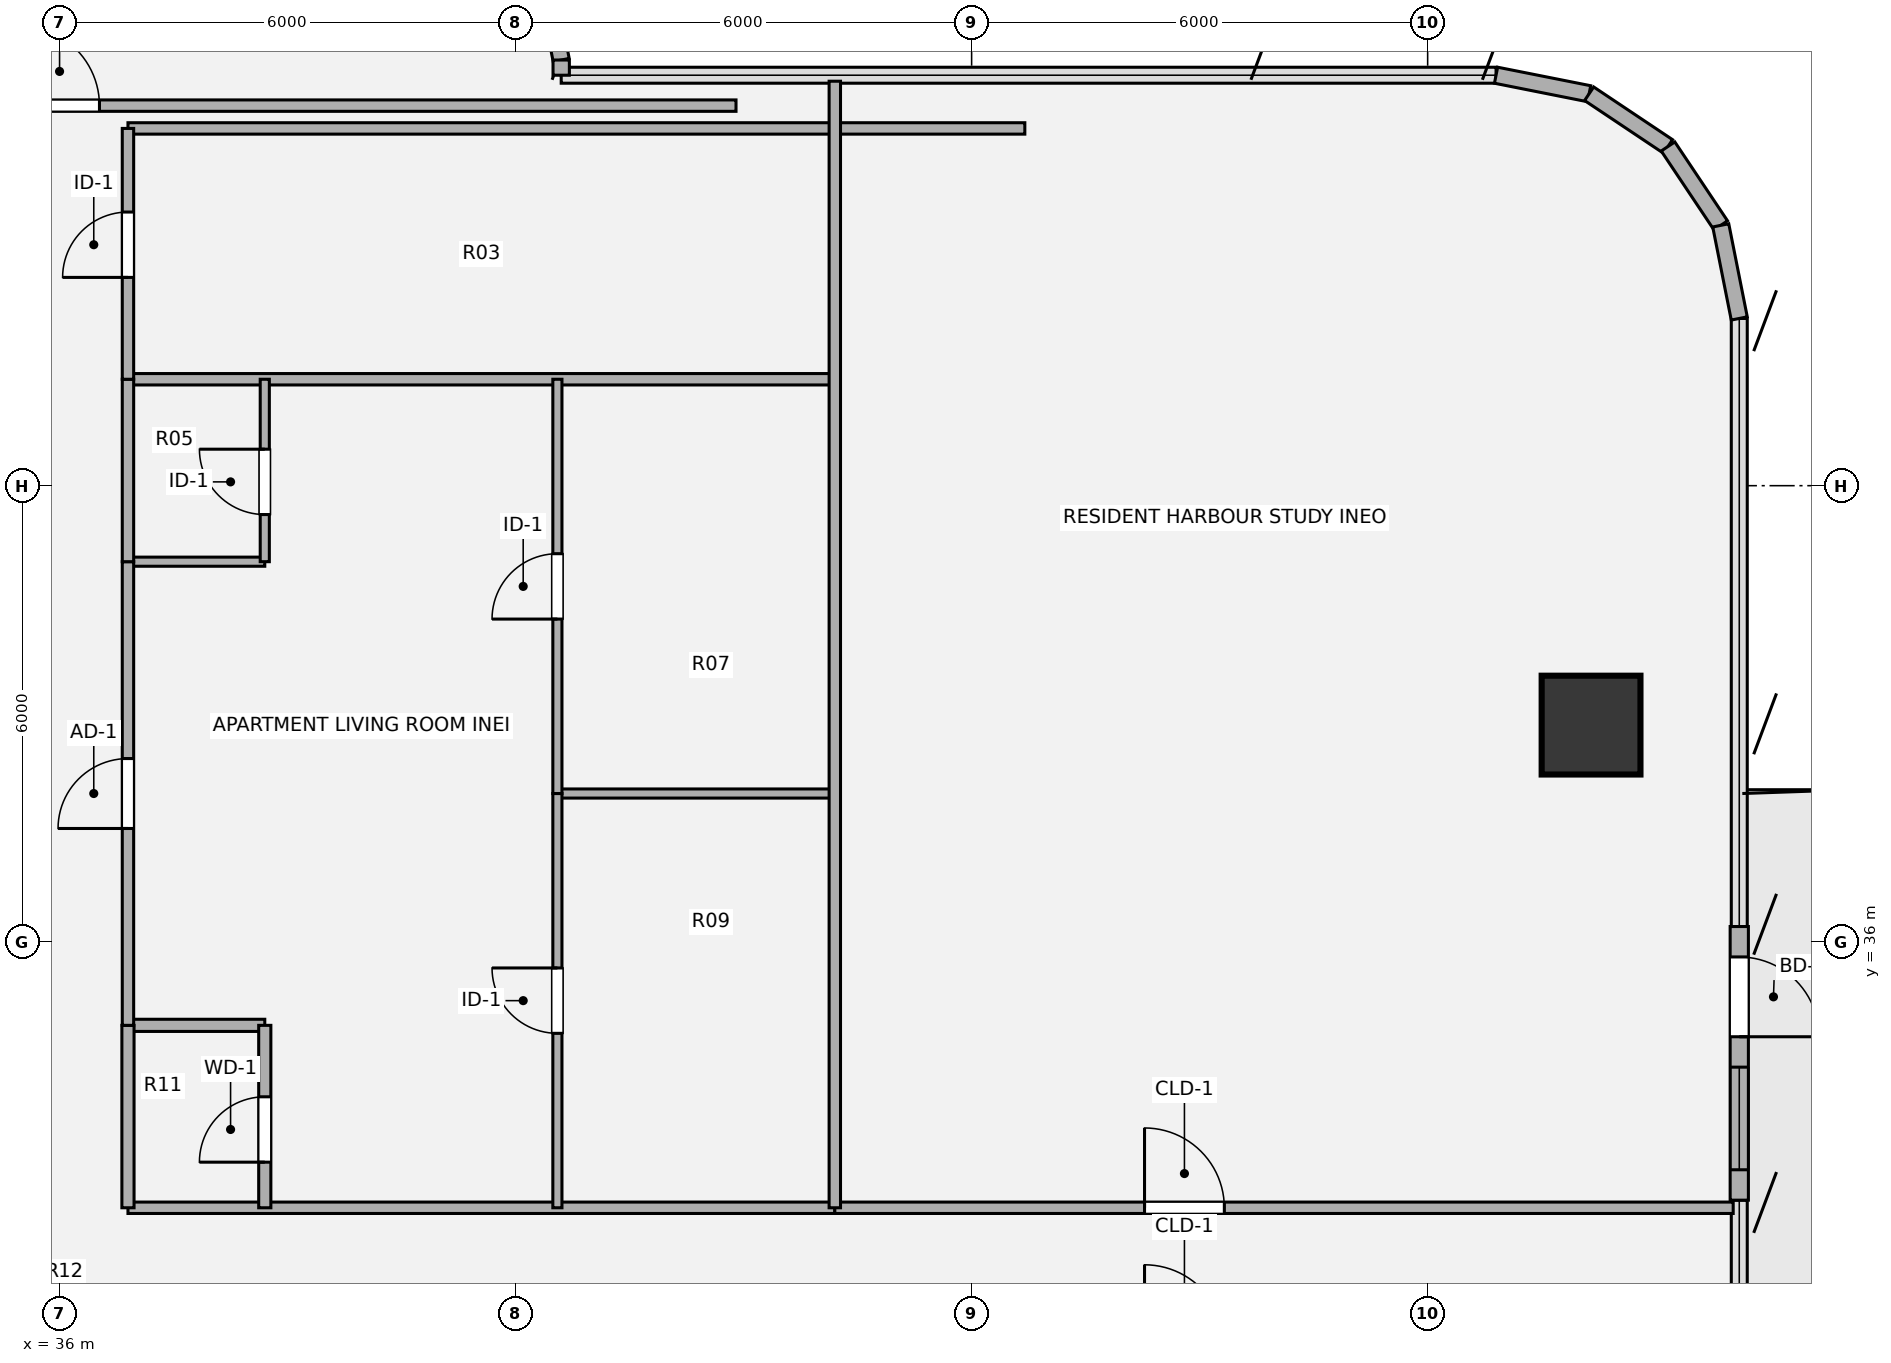
"""IFC4 building model, lengths in metres.
Left out: names, types, materials, properties, quantities, classifications, styles, units other than length and angle.
Written with IfcOpenShell. Run it as: python <this file> out.ifc"""

import sys

from ifc_helpers import new_model, si_unit, direction, frame, frame_2d, origin, origin_2d, place, context, subcontext, project, spatial, rectangle, hollow_circle, extrude, source, transform, mapped, element, fill, save


model = new_model("IFC4")
c1 = context("Model", 3, precision=1e-05, world=origin(), true_north=direction((0.0, 1.0)))
c2 = subcontext(c1, "Body", "Model", "MODEL_VIEW")
j1 = project(units=[si_unit("LENGTHUNIT", "METRE"), si_unit("PLANEANGLEUNIT", "RADIAN")], contexts=[c1])
p1 = place(None, origin())
s1 = spatial("IfcSite", under=j1, at=p1, CompositionType="ELEMENT")
p2 = place(p1, origin())
s2 = spatial("IfcBuilding", under=s1, at=p2, CompositionType="ELEMENT")
p3 = place(p2, frame((0.0, 0.0, 142.74)))
s3 = spatial("IfcBuildingStorey", under=s2, at=p3, CompositionType="ELEMENT", Elevation=142.74)
m1 = source(origin(), c2, "Body", "SweptSolid", [
    extrude(hollow_circle(Radius=0.65, WallThickness=0.045, at=origin_2d()), origin(), (0.0, 0.0, 1.0), 3.372),
])
p4 = place(p3, frame((56.15, 38.85, 0.0), z_axis=(0.0, 0.0, 1.0), x_axis=(1.0, 0.0, 0.0)))
e1 = element("IfcColumn", 1, at=p4, inside=s3, PredefinedType="COLUMN", context=c2, shape_type="MappedRepresentation", body=[
    mapped(m1, transform((0.0, 0.0, 0.0), x_axis=(1.0, 0.0, 0.0), y_axis=(0.0, 1.0, 0.0), z_axis=(0.0, 0.0, 1.0), scale=1.0)),
])
p5 = place(p3, frame((42.387, 48.671, 0.0), z_axis=(0.0, 0.0, 1.0), x_axis=(0.195127417394, -0.980777900945, 0.0)))
e2 = element("IfcWall", 2, at=p5, inside=s3, PredefinedType="SOLIDWALL", context=c2, shape_type="SweptSolid", body=[
    extrude(rectangle(XDim=1.092, YDim=0.215, at=frame_2d((0.546, 0.0))), origin(), (0.0, 0.0, 1.0), 3.372),
])
p6 = place(p3, frame((42.6, 47.6, 0.0), z_axis=(0.0, 0.0, 1.0), x_axis=(0.0, -1.0, 0.0)))
e3 = element("IfcWall", 3, at=p6, inside=s3, PredefinedType="SOLIDWALL", context=c2, shape_type="SweptSolid", body=[
    extrude(rectangle(XDim=0.2, YDim=0.215, at=frame_2d((0.1, 0.0))), origin(), (0.0, 0.0, 1.0), 3.372),
])
for number, where, z_axis, x_axis in (
    (4, (54.9, 47.4, 0.0), (0.0, 0.0, 1.0), (0.981, -0.195, 0.0)),
    (5, (56.125, 47.156, 0.0), (0.0, 0.0, 1.0), (0.831, -0.556, 0.0)),
    (6, (57.163, 46.463, 0.0), (0.0, 0.0, 1.0), (0.556, -0.831, 0.0)),
    (7, (57.856, 45.425, 0.0), (0.0, 0.0, 1.0), (0.195, -0.981, 0.0)),
):
    element("IfcWall", number, at=place(p3, frame(where, z_axis=z_axis, x_axis=x_axis)), inside=s3, PredefinedType="SOLIDWALL", context=c2, shape_type="SweptSolid", body=[
        extrude(rectangle(XDim=1.249, YDim=0.215, at=frame_2d((0.624, 0.0))), origin(), (0.0, 0.0, 1.0), 3.372),
    ])
p7 = place(p3, frame((58.1, 36.2, 0.0), z_axis=(0.0, 0.0, 1.0), x_axis=(0.0, -1.0, 0.0)))
e8 = element("IfcWall", 8, at=p7, inside=s3, PredefinedType="SOLIDWALL", context=c2, shape_type="SweptSolid", body=[
    extrude(rectangle(XDim=3.6, YDim=0.24, at=frame_2d((1.8, 0.0))), origin(), (0.0, 0.0, 1.0), 3.372),
])
p8 = place(p7, frame((0.4, 0.0, 0.0)))
e9 = element("IfcOpeningElement", 9, at=p8, cuts=e8, PredefinedType="OPENING", context=c2, shape_type="SweptSolid", body=[
    extrude(rectangle(XDim=1.05, YDim=2.15, at=origin_2d()), frame((0.525, 0.13, 1.075), z_axis=(0.0, -1.0, 0.0), x_axis=(1.0, 0.0, 0.0)), (0.0, 0.0, 1.0), 0.26),
])
p9 = place(p7, frame((1.85, 0.0, 0.85)))
e10 = element("IfcOpeningElement", 10, at=p9, cuts=e8, PredefinedType="OPENING", context=c2, shape_type="SweptSolid", body=[
    extrude(rectangle(XDim=1.35, YDim=1.35, at=origin_2d()), frame((0.675, 0.13, 0.675), z_axis=(0.0, -1.0, 0.0), x_axis=(1.0, 0.0, 0.0)), (0.0, 0.0, 1.0), 0.26),
])
p10 = place(p3, frame((36.9, 32.5, 0.0), z_axis=(0.0, 0.0, 1.0), x_axis=(1.0, 0.0, 0.0)))
e11 = element("IfcWall", 11, at=p10, inside=s3, PredefinedType="PARTITIONING", context=c2, shape_type="SweptSolid", body=[
    extrude(rectangle(XDim=9.3, YDim=0.15, at=frame_2d((4.65, 0.0))), origin(), (0.0, 0.0, 1.0), 2.824),
])
p11 = place(p3, frame((46.2, 32.5, 0.0), z_axis=(0.0, 0.0, 1.0), x_axis=(1.0, 0.0, 0.0)))
e12 = element("IfcWall", 12, at=p11, inside=s3, PredefinedType="PARTITIONING", context=c2, shape_type="SweptSolid", body=[
    extrude(rectangle(XDim=11.82, YDim=0.15, at=frame_2d((5.91, 0.0))), origin(), (0.0, 0.0, 1.0), 2.824),
])
p12 = place(p11, frame((4.075, 0.0, 0.0)))
e13 = element("IfcOpeningElement", 13, at=p12, cuts=e12, PredefinedType="OPENING", context=c2, shape_type="SweptSolid", body=[
    extrude(rectangle(XDim=1.05, YDim=2.1, at=origin_2d()), frame((0.525, 0.085, 1.05), z_axis=(0.0, -1.0, 0.0), x_axis=(1.0, 0.0, 0.0)), (0.0, 0.0, 1.0), 0.17),
])
p13 = place(p3, frame((36.9, 34.9, 0.0), z_axis=(0.0, 0.0, 1.0), x_axis=(1.0, 0.0, 0.0)))
e14 = element("IfcWall", 14, at=p13, inside=s3, PredefinedType="PLUMBINGWALL", context=c2, shape_type="SweptSolid", body=[
    extrude(rectangle(XDim=1.8, YDim=0.16, at=frame_2d((0.9, 0.0))), origin(), (0.0, 0.0, 1.0), 3.101),
])
p14 = place(p3, frame((42.55, 37.95, 0.0), z_axis=(0.0, 0.0, 1.0), x_axis=(1.0, 0.0, 0.0)))
e15 = element("IfcWall", 15, at=p14, inside=s3, PredefinedType="PARTITIONING", context=c2, shape_type="SweptSolid", body=[
    extrude(rectangle(XDim=3.65, YDim=0.12, at=frame_2d((1.825, 0.0))), origin(), (0.0, 0.0, 1.0), 3.342),
])
p15 = place(p3, frame((36.9, 41.0, 0.0), z_axis=(0.0, 0.0, 1.0), x_axis=(1.0, 0.0, 0.0)))
e16 = element("IfcWall", 16, at=p15, inside=s3, PredefinedType="PARTITIONING", context=c2, shape_type="SweptSolid", body=[
    extrude(rectangle(XDim=1.8, YDim=0.12, at=frame_2d((0.9, 0.0))), origin(), (0.0, 0.0, 1.0), 3.101),
])
p16 = place(p3, frame((36.9, 43.4, 0.0), z_axis=(0.0, 0.0, 1.0), x_axis=(1.0, 0.0, 0.0)))
e17 = element("IfcWall", 17, at=p16, inside=s3, PredefinedType="PARTITIONING", context=c2, shape_type="SweptSolid", body=[
    extrude(rectangle(XDim=9.3, YDim=0.15, at=frame_2d((4.65, 0.0))), origin(), (0.0, 0.0, 1.0), 3.15),
])
p17 = place(p3, frame((36.9, 46.7, 0.0), z_axis=(0.0, 0.0, 1.0), x_axis=(1.0, 0.0, 0.0)))
e18 = element("IfcWall", 18, at=p17, inside=s3, PredefinedType="PARTITIONING", context=c2, shape_type="SweptSolid", body=[
    extrude(rectangle(XDim=11.8, YDim=0.15, at=frame_2d((5.9, 0.0))), origin(), (0.0, 0.0, 1.0), 3.15),
])
p18 = place(p3, frame((27.1, 47.0, 0.0), z_axis=(0.0, 0.0, 1.0), x_axis=(1.0, 0.0, 0.0)))
e19 = element("IfcWall", 19, at=p18, inside=s3, PredefinedType="PARTITIONING", context=c2, shape_type="SweptSolid", body=[
    extrude(rectangle(XDim=17.8, YDim=0.15, at=frame_2d((8.9, 0.0))), origin(), (0.0, 0.0, 1.0), 3.15),
])
p19 = place(p18, frame((8.375, 0.0, 0.0)))
e20 = element("IfcOpeningElement", 20, at=p19, cuts=e19, PredefinedType="OPENING", context=c2, shape_type="SweptSolid", body=[
    extrude(rectangle(XDim=1.05, YDim=2.1, at=origin_2d()), frame((0.525, 0.085, 1.05), z_axis=(0.0, -1.0, 0.0), x_axis=(1.0, 0.0, 0.0)), (0.0, 0.0, 1.0), 0.17),
])
p20 = place(p3, frame((36.9, 32.5, 0.0), z_axis=(0.0, 0.0, 1.0), x_axis=(0.0, 1.0, 0.0)))
e21 = element("IfcWall", 21, at=p20, inside=s3, PredefinedType="PLUMBINGWALL", context=c2, shape_type="SweptSolid", body=[
    extrude(rectangle(XDim=2.4, YDim=0.16, at=frame_2d((1.2, 0.0))), origin(), (0.0, 0.0, 1.0), 3.342),
])
p21 = place(p3, frame((36.9, 34.9, 0.0), z_axis=(0.0, 0.0, 1.0), x_axis=(0.0, 1.0, 0.0)))
e22 = element("IfcWall", 22, at=p21, inside=s3, PredefinedType="PARTITIONING", context=c2, shape_type="SweptSolid", body=[
    extrude(rectangle(XDim=6.1, YDim=0.15, at=frame_2d((3.05, 0.0))), origin(), (0.0, 0.0, 1.0), 3.342),
])
p22 = place(p21, frame((2.59, 0.0, 0.0)))
e23 = element("IfcOpeningElement", 23, at=p22, cuts=e22, PredefinedType="OPENING", context=c2, shape_type="SweptSolid", body=[
    extrude(rectangle(XDim=0.92, YDim=2.1, at=origin_2d()), frame((0.46, 0.085, 1.05), z_axis=(0.0, -1.0, 0.0), x_axis=(1.0, 0.0, 0.0)), (0.0, 0.0, 1.0), 0.17),
])
p23 = place(p3, frame((36.9, 41.0, 0.0), z_axis=(0.0, 0.0, 1.0), x_axis=(0.0, 1.0, 0.0)))
e24 = element("IfcWall", 24, at=p23, inside=s3, PredefinedType="PARTITIONING", context=c2, shape_type="SweptSolid", body=[
    extrude(rectangle(XDim=2.4, YDim=0.15, at=frame_2d((1.2, 0.0))), origin(), (0.0, 0.0, 1.0), 3.342),
])
p24 = place(p3, frame((36.9, 43.4, 0.0), z_axis=(0.0, 0.0, 1.0), x_axis=(0.0, 1.0, 0.0)))
e25 = element("IfcWall", 25, at=p24, inside=s3, PredefinedType="PARTITIONING", context=c2, shape_type="SweptSolid", body=[
    extrude(rectangle(XDim=3.3, YDim=0.15, at=frame_2d((1.65, 0.0))), origin(), (0.0, 0.0, 1.0), 3.342),
])
p25 = place(p24, frame((1.34, 0.0, 0.0)))
e26 = element("IfcOpeningElement", 26, at=p25, cuts=e25, PredefinedType="OPENING", context=c2, shape_type="SweptSolid", body=[
    extrude(rectangle(XDim=0.86, YDim=2.1, at=origin_2d()), frame((0.43, 0.085, 1.05), z_axis=(0.0, -1.0, 0.0), x_axis=(1.0, 0.0, 0.0)), (0.0, 0.0, 1.0), 0.17),
])
p26 = place(p3, frame((38.7, 32.5, 0.0), z_axis=(0.0, 0.0, 1.0), x_axis=(0.0, 1.0, 0.0)))
e27 = element("IfcWall", 27, at=p26, inside=s3, PredefinedType="PLUMBINGWALL", context=c2, shape_type="SweptSolid", body=[
    extrude(rectangle(XDim=2.4, YDim=0.16, at=frame_2d((1.2, 0.0))), origin(), (0.0, 0.0, 1.0), 3.342),
])
p27 = place(p26, frame((0.6, 0.0, 0.0)))
e28 = element("IfcOpeningElement", 28, at=p27, cuts=e27, PredefinedType="OPENING", context=c2, shape_type="SweptSolid", body=[
    extrude(rectangle(XDim=0.86, YDim=2.1, at=origin_2d()), frame((0.43, 0.09, 1.05), z_axis=(0.0, -1.0, 0.0), x_axis=(1.0, 0.0, 0.0)), (0.0, 0.0, 1.0), 0.18),
])
p28 = place(p3, frame((38.7, 41.0, 0.0), z_axis=(0.0, 0.0, 1.0), x_axis=(0.0, 1.0, 0.0)))
e29 = element("IfcWall", 29, at=p28, inside=s3, PredefinedType="PARTITIONING", context=c2, shape_type="SweptSolid", body=[
    extrude(rectangle(XDim=2.4, YDim=0.12, at=frame_2d((1.2, 0.0))), origin(), (0.0, 0.0, 1.0), 3.342),
])
p29 = place(p28, frame((0.62, 0.0, 0.0)))
e30 = element("IfcOpeningElement", 30, at=p29, cuts=e29, PredefinedType="OPENING", context=c2, shape_type="SweptSolid", body=[
    extrude(rectangle(XDim=0.86, YDim=2.1, at=origin_2d()), frame((0.43, 0.07, 1.05), z_axis=(0.0, -1.0, 0.0), x_axis=(1.0, 0.0, 0.0)), (0.0, 0.0, 1.0), 0.14),
])
p30 = place(p3, frame((42.55, 32.5, 0.0), z_axis=(0.0, 0.0, 1.0), x_axis=(0.0, 1.0, 0.0)))
e31 = element("IfcWall", 31, at=p30, inside=s3, PredefinedType="PARTITIONING", context=c2, shape_type="SweptSolid", body=[
    extrude(rectangle(XDim=5.45, YDim=0.12, at=frame_2d((2.725, 0.0))), origin(), (0.0, 0.0, 1.0), 3.342),
])
p31 = place(p30, frame((2.295, 0.0, 0.0)))
e32 = element("IfcOpeningElement", 32, at=p31, cuts=e31, PredefinedType="OPENING", context=c2, shape_type="SweptSolid", body=[
    extrude(rectangle(XDim=0.86, YDim=2.1, at=origin_2d()), frame((0.43, 0.07, 1.05), z_axis=(0.0, -1.0, 0.0), x_axis=(1.0, 0.0, 0.0)), (0.0, 0.0, 1.0), 0.14),
])
p32 = place(p3, frame((42.55, 37.95, 0.0), z_axis=(0.0, 0.0, 1.0), x_axis=(0.0, 1.0, 0.0)))
e33 = element("IfcWall", 33, at=p32, inside=s3, PredefinedType="PARTITIONING", context=c2, shape_type="SweptSolid", body=[
    extrude(rectangle(XDim=5.45, YDim=0.12, at=frame_2d((2.725, 0.0))), origin(), (0.0, 0.0, 1.0), 3.342),
])
p33 = place(p32, frame((2.295, 0.0, 0.0)))
e34 = element("IfcOpeningElement", 34, at=p33, cuts=e33, PredefinedType="OPENING", context=c2, shape_type="SweptSolid", body=[
    extrude(rectangle(XDim=0.86, YDim=2.1, at=origin_2d()), frame((0.43, 0.07, 1.05), z_axis=(0.0, -1.0, 0.0), x_axis=(1.0, 0.0, 0.0)), (0.0, 0.0, 1.0), 0.14),
])
p34 = place(p3, frame((46.2, 32.5, 0.0), z_axis=(0.0, 0.0, 1.0), x_axis=(0.0, 1.0, 0.0)))
e35 = element("IfcWall", 35, at=p34, inside=s3, PredefinedType="PARTITIONING", context=c2, shape_type="SweptSolid", body=[
    extrude(rectangle(XDim=14.821, YDim=0.15, at=frame_2d((7.411, 0.0))), origin(), (0.0, 0.0, 1.0), 3.342),
])
m2 = source(origin(), c2, "Body", "SweptSolid", [
    extrude(rectangle(XDim=1.05, YDim=2.15, at=origin_2d()), frame((0.525, 0.025, 1.075), z_axis=(0.0, -1.0, 0.0), x_axis=(1.0, 0.0, 0.0)), (0.0, 0.0, 1.0), 0.05),
])
p35 = place(p8, origin())
e36 = element("IfcDoor", 36, at=p35, inside=s3, OperationType="SINGLE_SWING_RIGHT", PredefinedType="DOOR", context=c2, shape_type="MappedRepresentation", body=[
    mapped(m2, transform((0.0, 0.0, 0.0), x_axis=(1.0, 0.0, 0.0), y_axis=(0.0, 1.0, 0.0), z_axis=(0.0, 0.0, 1.0), scale=1.0)),
])
fill(e9, e36)
m3 = source(origin(), c2, "Body", "SweptSolid", [
    extrude(rectangle(XDim=1.35, YDim=1.35, at=origin_2d()), frame((0.675, 0.03, 0.675), z_axis=(0.0, -1.0, 0.0), x_axis=(1.0, 0.0, 0.0)), (0.0, 0.0, 1.0), 0.06),
])
p36 = place(p9, origin())
e37 = element("IfcWindow", 37, at=p36, inside=s3, PartitioningType="SINGLE_PANEL", PredefinedType="WINDOW", context=c2, shape_type="MappedRepresentation", body=[
    mapped(m3, transform((0.0, 0.0, 0.0), x_axis=(1.0, 0.0, 0.0), y_axis=(0.0, 1.0, 0.0), z_axis=(0.0, 0.0, 1.0), scale=1.0)),
])
fill(e10, e37)
m4 = source(origin(), c2, "Body", "SweptSolid", [
    extrude(rectangle(XDim=1.05, YDim=2.1, at=origin_2d()), frame((0.525, 0.025, 1.05), z_axis=(0.0, -1.0, 0.0), x_axis=(1.0, 0.0, 0.0)), (0.0, 0.0, 1.0), 0.05),
])
p37 = place(p12, origin())
e38 = element("IfcDoor", 38, at=p37, inside=s3, OperationType="SINGLE_SWING_LEFT", PredefinedType="DOOR", context=c2, shape_type="MappedRepresentation", body=[
    mapped(m4, transform((0.0, 0.0, 0.0), x_axis=(1.0, 0.0, 0.0), y_axis=(0.0, 1.0, 0.0), z_axis=(0.0, 0.0, 1.0), scale=1.0)),
])
fill(e13, e38)
p38 = place(p19, origin())
e39 = element("IfcDoor", 39, at=p38, inside=s3, OperationType="SINGLE_SWING_LEFT", PredefinedType="DOOR", context=c2, shape_type="MappedRepresentation", body=[
    mapped(m4, transform((0.0, 0.0, 0.0), x_axis=(1.0, 0.0, 0.0), y_axis=(0.0, 1.0, 0.0), z_axis=(0.0, 0.0, 1.0), scale=1.0)),
])
fill(e20, e39)
m5 = source(origin(), c2, "Body", "SweptSolid", [
    extrude(rectangle(XDim=0.92, YDim=2.1, at=origin_2d()), frame((0.46, 0.025, 1.05), z_axis=(0.0, -1.0, 0.0), x_axis=(1.0, 0.0, 0.0)), (0.0, 0.0, 1.0), 0.05),
])
p39 = place(p22, origin())
e40 = element("IfcDoor", 40, at=p39, inside=s3, OperationType="SINGLE_SWING_LEFT", PredefinedType="DOOR", context=c2, shape_type="MappedRepresentation", body=[
    mapped(m5, transform((0.0, 0.0, 0.0), x_axis=(1.0, 0.0, 0.0), y_axis=(0.0, 1.0, 0.0), z_axis=(0.0, 0.0, 1.0), scale=1.0)),
])
fill(e23, e40)
m6 = source(origin(), c2, "Body", "SweptSolid", [
    extrude(rectangle(XDim=0.86, YDim=2.1, at=origin_2d()), frame((0.43, 0.025, 1.05), z_axis=(0.0, -1.0, 0.0), x_axis=(1.0, 0.0, 0.0)), (0.0, 0.0, 1.0), 0.05),
])
p40 = place(p25, origin())
e41 = element("IfcDoor", 41, at=p40, inside=s3, OperationType="SINGLE_SWING_LEFT", PredefinedType="DOOR", context=c2, shape_type="MappedRepresentation", body=[
    mapped(m6, transform((0.0, 0.0, 0.0), x_axis=(1.0, 0.0, 0.0), y_axis=(0.0, 1.0, 0.0), z_axis=(0.0, 0.0, 1.0), scale=1.0)),
])
fill(e26, e41)
m7 = source(origin(), c2, "Body", "SweptSolid", [
    extrude(rectangle(XDim=0.86, YDim=2.1, at=origin_2d()), frame((0.43, 0.025, 1.05), z_axis=(0.0, -1.0, 0.0), x_axis=(1.0, 0.0, 0.0)), (0.0, 0.0, 1.0), 0.05),
])
p41 = place(p27, origin())
e42 = element("IfcDoor", 42, at=p41, inside=s3, OperationType="SINGLE_SWING_LEFT", PredefinedType="DOOR", context=c2, shape_type="MappedRepresentation", body=[
    mapped(m7, transform((0.0, 0.0, 0.0), x_axis=(1.0, 0.0, 0.0), y_axis=(0.0, 1.0, 0.0), z_axis=(0.0, 0.0, 1.0), scale=1.0)),
])
fill(e28, e42)
p42 = place(p29, origin())
e43 = element("IfcDoor", 43, at=p42, inside=s3, OperationType="SINGLE_SWING_RIGHT", PredefinedType="DOOR", context=c2, shape_type="MappedRepresentation", body=[
    mapped(m6, transform((0.0, 0.0, 0.0), x_axis=(1.0, 0.0, 0.0), y_axis=(0.0, 1.0, 0.0), z_axis=(0.0, 0.0, 1.0), scale=1.0)),
])
fill(e30, e43)
p43 = place(p31, origin())
e44 = element("IfcDoor", 44, at=p43, inside=s3, OperationType="SINGLE_SWING_RIGHT", PredefinedType="DOOR", context=c2, shape_type="MappedRepresentation", body=[
    mapped(m6, transform((0.0, 0.0, 0.0), x_axis=(1.0, 0.0, 0.0), y_axis=(0.0, 1.0, 0.0), z_axis=(0.0, 0.0, 1.0), scale=1.0)),
])
fill(e32, e44)
p44 = place(p33, origin())
e45 = element("IfcDoor", 45, at=p44, inside=s3, OperationType="SINGLE_SWING_LEFT", PredefinedType="DOOR", context=c2, shape_type="MappedRepresentation", body=[
    mapped(m6, transform((0.0, 0.0, 0.0), x_axis=(1.0, 0.0, 0.0), y_axis=(0.0, 1.0, 0.0), z_axis=(0.0, 0.0, 1.0), scale=1.0)),
])
fill(e34, e45)
save(model, sys.argv[1])
